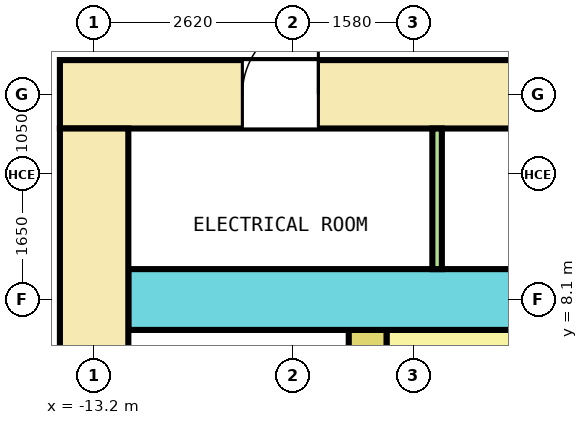
"""IFC4 building model, lengths in metres.
Left out: names, types, materials, properties, quantities, classifications, styles, units other than length and angle.
Written with IfcOpenShell. Run it as: python <this file> out.ifc"""

import sys

from ifc_helpers import new_model, si_unit, direction, frame, frame_2d, origin, place, context, subcontext, project, spatial, rectangle, extrude, element, fill, save


model = new_model("IFC4")
c1 = context("Model", 3, precision=1e-05, world=origin(), true_north=direction((0.0, 1.0)))
c2 = subcontext(c1, "Body", "Model", "MODEL_VIEW")
j1 = project(units=[si_unit("LENGTHUNIT", "METRE"), si_unit("PLANEANGLEUNIT", "RADIAN")], contexts=[c1])
p1 = place(None, origin())
s1 = spatial("IfcSite", under=j1, at=p1, CompositionType="ELEMENT")
p2 = place(p1, origin())
s2 = spatial("IfcBuilding", under=s1, at=p2, CompositionType="ELEMENT")
p3 = place(p2, frame((0.0, 0.0, 45.4)))
s3 = spatial("IfcBuildingStorey", under=s2, at=p3, CompositionType="ELEMENT", Elevation=45.4)
p4 = place(p3, frame((-13.65, 10.8, 0.0), z_axis=(0.0, 0.0, 1.0), x_axis=(1.0, 0.0, 0.0)))
e1 = element("IfcWall", 1, at=p4, inside=s3, PredefinedType="SHEAR", context=c2, shape_type="SweptSolid", body=[
    extrude(rectangle(XDim=27.3, YDim=0.9, at=frame_2d((13.65, 0.0))), origin(), (0.0, 0.0, 1.0), 4.1),
])
p5 = place(p4, frame((2.4, 0.0, 0.0)))
e2 = element("IfcOpeningElement", 2, at=p5, cuts=e1, PredefinedType="OPENING", context=c2, shape_type="SweptSolid", body=[
    extrude(rectangle(XDim=1.0, YDim=2.1, at=frame_2d((0.5, 1.05))), frame((0.0, 0.46, 0.0), z_axis=(0.0, -1.0, 0.0), x_axis=(1.0, 0.0, 0.0)), (0.0, 0.0, 1.0), 0.92),
])
p6 = place(p4, frame((6.494, 0.0, 0.0)))
e3 = element("IfcOpeningElement", 3, at=p6, cuts=e1, PredefinedType="OPENING", context=c2, shape_type="SweptSolid", body=[
    extrude(rectangle(XDim=1.0, YDim=2.1, at=frame_2d((0.5, 1.05))), frame((0.0, 0.46, 0.0), z_axis=(0.0, -1.0, 0.0), x_axis=(1.0, 0.0, 0.0)), (0.0, 0.0, 1.0), 0.92),
])
p7 = place(p4, frame((10.556, 0.0, 0.0)))
e4 = element("IfcOpeningElement", 4, at=p7, cuts=e1, PredefinedType="OPENING", context=c2, shape_type="SweptSolid", body=[
    extrude(rectangle(XDim=1.0, YDim=2.1, at=frame_2d((0.5, 1.05))), frame((0.0, 0.46, 0.0), z_axis=(0.0, -1.0, 0.0), x_axis=(1.0, 0.0, 0.0)), (0.0, 0.0, 1.0), 0.92),
])
p8 = place(p4, frame((18.077, 0.0, 0.0)))
e5 = element("IfcOpeningElement", 5, at=p8, cuts=e1, PredefinedType="OPENING", context=c2, shape_type="SweptSolid", body=[
    extrude(rectangle(XDim=1.0, YDim=2.1, at=frame_2d((0.5, 1.05))), frame((0.0, 0.46, 0.0), z_axis=(0.0, -1.0, 0.0), x_axis=(1.0, 0.0, 0.0)), (0.0, 0.0, 1.0), 0.92),
])
p9 = place(p4, frame((21.206, 0.0, 0.0)))
e6 = element("IfcOpeningElement", 6, at=p9, cuts=e1, PredefinedType="OPENING", context=c2, shape_type="SweptSolid", body=[
    extrude(rectangle(XDim=1.0, YDim=2.1, at=frame_2d((0.5, 1.05))), frame((0.0, 0.46, 0.0), z_axis=(0.0, -1.0, 0.0), x_axis=(1.0, 0.0, 0.0)), (0.0, 0.0, 1.0), 0.92),
])
p10 = place(p4, frame((24.367, 0.0, 0.0)))
e7 = element("IfcOpeningElement", 7, at=p10, cuts=e1, PredefinedType="OPENING", context=c2, shape_type="SweptSolid", body=[
    extrude(rectangle(XDim=1.0, YDim=2.1, at=frame_2d((0.5, 1.05))), frame((0.0, 0.46, 0.0), z_axis=(0.0, -1.0, 0.0), x_axis=(1.0, 0.0, 0.0)), (0.0, 0.0, 1.0), 0.92),
])
p11 = place(p4, frame((14.575, 0.0, 0.0)))
e8 = element("IfcOpeningElement", 8, at=p11, cuts=e1, PredefinedType="OPENING", context=c2, shape_type="SweptSolid", body=[
    extrude(rectangle(XDim=1.4, YDim=2.1, at=frame_2d((0.7, 1.05))), frame((0.0, 0.46, 0.0), z_axis=(0.0, -1.0, 0.0), x_axis=(1.0, 0.0, 0.0)), (0.0, 0.0, 1.0), 0.92),
])
p12 = place(p3, frame((-13.2, -10.35, 0.0), z_axis=(0.0, 0.0, 1.0), x_axis=(0.0, 1.0, 0.0)))
e9 = element("IfcWall", 9, at=p12, inside=s3, PredefinedType="SHEAR", context=c2, shape_type="SweptSolid", body=[
    extrude(rectangle(XDim=20.7, YDim=0.9, at=frame_2d((10.35, 0.0))), origin(), (0.0, 0.0, 1.0), 4.1),
])
p13 = place(p12, frame((9.15, 0.0, 0.0)))
e10 = element("IfcOpeningElement", 10, at=p13, cuts=e9, PredefinedType="OPENING", context=c2, shape_type="SweptSolid", body=[
    extrude(rectangle(XDim=2.4, YDim=2.1, at=frame_2d((1.2, 1.05))), frame((0.0, 0.46, 0.0), z_axis=(0.0, -1.0, 0.0), x_axis=(1.0, 0.0, 0.0)), (0.0, 0.0, 1.0), 0.92),
])
p14 = place(p12, frame((16.05, 0.0, 0.0)))
e11 = element("IfcOpeningElement", 11, at=p14, cuts=e9, PredefinedType="OPENING", context=c2, shape_type="SweptSolid", body=[
    extrude(rectangle(XDim=1.2, YDim=2.1, at=frame_2d((0.6, 1.05))), frame((0.0, 0.46, 0.0), z_axis=(0.0, -1.0, 0.0), x_axis=(1.0, 0.0, 0.0)), (0.0, 0.0, 1.0), 0.92),
])
p15 = place(p12, frame((3.45, 0.0, 0.0)))
e12 = element("IfcOpeningElement", 12, at=p15, cuts=e9, PredefinedType="OPENING", context=c2, shape_type="SweptSolid", body=[
    extrude(rectangle(XDim=1.2, YDim=2.1, at=frame_2d((0.6, 1.05))), frame((0.0, 0.46, 0.0), z_axis=(0.0, -1.0, 0.0), x_axis=(1.0, 0.0, 0.0)), (0.0, 0.0, 1.0), 0.92),
])
p16 = place(p3, frame((-12.75, 8.1, 0.0), z_axis=(0.0, 0.0, 1.0), x_axis=(1.0, 0.0, 0.0)))
e13 = element("IfcWall", 13, at=p16, inside=s3, PredefinedType="SHEAR", context=c2, shape_type="SweptSolid", body=[
    extrude(rectangle(XDim=25.5, YDim=0.8, at=frame_2d((12.75, 0.0))), origin(), (0.0, 0.0, 1.0), 4.1),
])
p17 = place(p16, frame((13.675, 0.0, 0.0)))
e14 = element("IfcOpeningElement", 14, at=p17, cuts=e13, PredefinedType="OPENING", context=c2, shape_type="SweptSolid", body=[
    extrude(rectangle(XDim=1.4, YDim=2.1, at=frame_2d((0.7, 1.05))), frame((0.0, 0.41, 0.0), z_axis=(0.0, -1.0, 0.0), x_axis=(1.0, 0.0, 0.0)), (0.0, 0.0, 1.0), 0.82),
])
p18 = place(p3, frame((-9.6, -7.7, 0.0), z_axis=(0.0, 0.0, 1.0), x_axis=(0.0, 1.0, 0.0)))
e15 = element("IfcWall", 15, at=p18, inside=s3, PredefinedType="SHEAR", context=c2, shape_type="SweptSolid", body=[
    extrude(rectangle(XDim=15.4, YDim=0.5, at=frame_2d((7.7, 0.0))), origin(), (0.0, 0.0, 1.0), 4.1),
])
p19 = place(p18, frame((6.5, 0.0, 0.0)))
e16 = element("IfcOpeningElement", 16, at=p19, cuts=e15, PredefinedType="OPENING", context=c2, shape_type="SweptSolid", body=[
    extrude(rectangle(XDim=2.4, YDim=2.1, at=frame_2d((1.2, 1.05))), frame((0.0, 0.26, 0.0), z_axis=(0.0, -1.0, 0.0), x_axis=(1.0, 0.0, 0.0)), (0.0, 0.0, 1.0), 0.52),
])
p20 = place(p18, frame((13.4, 0.0, 0.0)))
e17 = element("IfcOpeningElement", 17, at=p20, cuts=e15, PredefinedType="OPENING", context=c2, shape_type="SweptSolid", body=[
    extrude(rectangle(XDim=1.2, YDim=2.1, at=frame_2d((0.6, 1.05))), frame((0.0, 0.26, 0.0), z_axis=(0.0, -1.0, 0.0), x_axis=(1.0, 0.0, 0.0)), (0.0, 0.0, 1.0), 0.52),
])
p21 = place(p18, frame((0.8, 0.0, 0.0)))
e18 = element("IfcOpeningElement", 18, at=p21, cuts=e15, PredefinedType="OPENING", context=c2, shape_type="SweptSolid", body=[
    extrude(rectangle(XDim=1.2, YDim=2.1, at=frame_2d((0.6, 1.05))), frame((0.0, 0.26, 0.0), z_axis=(0.0, -1.0, 0.0), x_axis=(1.0, 0.0, 0.0)), (0.0, 0.0, 1.0), 0.52),
])
p22 = place(p3, frame((-9.35, 7.575, 0.0), z_axis=(0.0, 0.0, 1.0), x_axis=(1.0, 0.0, 0.0)))
e19 = element("IfcWall", 19, at=p22, inside=s3, PredefinedType="SOLIDWALL", context=c2, shape_type="SweptSolid", body=[
    extrude(rectangle(XDim=5.8, YDim=0.25, at=frame_2d((2.9, 0.0))), origin(), (0.0, 0.0, 1.0), 4.1),
])
p23 = place(p3, frame((-8.688, 8.5, 0.0), z_axis=(0.0, 0.0, 1.0), x_axis=(0.0, 1.0, 0.0)))
e20 = element("IfcWall", 20, at=p23, inside=s3, PredefinedType="PARTITIONING", context=c2, shape_type="SweptSolid", body=[
    extrude(rectangle(XDim=1.85, YDim=0.125, at=frame_2d((0.925, 0.0))), origin(), (0.0, 0.0, 1.0), 4.1),
])
p24 = place(p5, origin())
e21 = element("IfcDoor", 21, at=p24, inside=s3, OperationType="SINGLE_SWING_LEFT", PredefinedType="DOOR", context=c2, shape_type="SweptSolid", body=[
    extrude(rectangle(XDim=1.0, YDim=2.1, at=frame_2d((0.5, 1.05))), frame((0.0, 0.3, 0.0), z_axis=(0.0, -1.0, 0.0), x_axis=(1.0, 0.0, 0.0)), (0.0, 0.0, 1.0), 0.6),
])
fill(e2, e21)
save(model, sys.argv[1])
